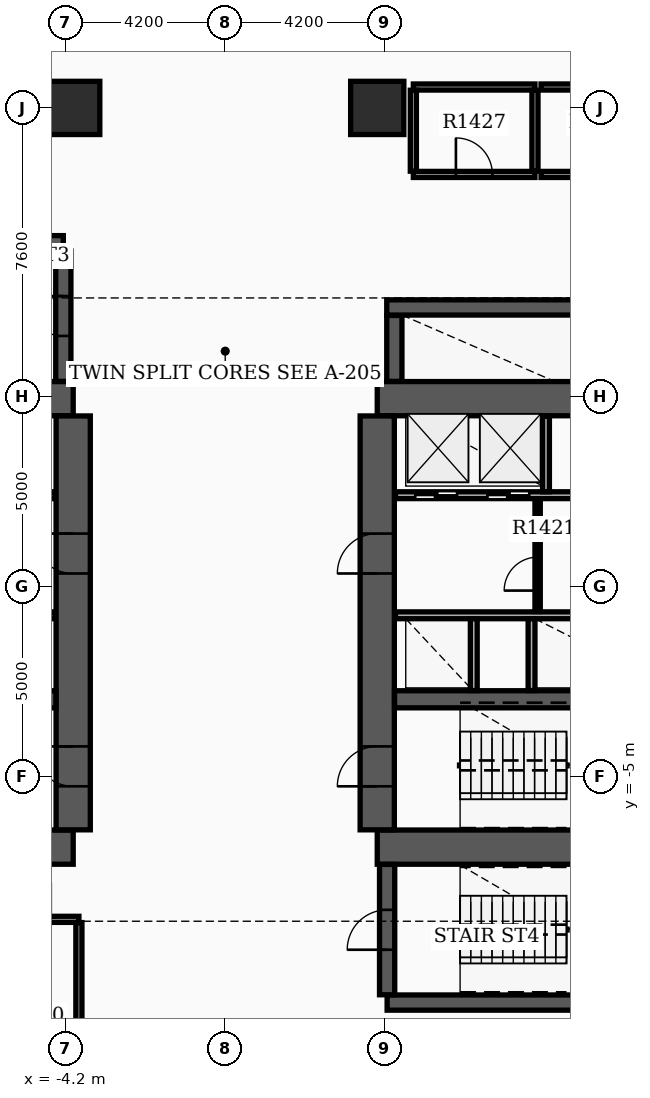
"""IFC4 building model, lengths in metres.
Left out: names, types, materials, properties, quantities, classifications, styles, units other than length and angle.
Written with IfcOpenShell. Run it as: python <this file> out.ifc"""

import sys

from ifc_helpers import new_model, si_unit, direction, frame, frame_2d, origin, origin_2d, place, context, subcontext, project, spatial, rectangle, extrude, element, fill, save


model = new_model("IFC4")
c1 = context("Model", 3, precision=1e-05, world=origin(), true_north=direction((0.0, 1.0)))
c2 = subcontext(c1, "Body", "Model", "MODEL_VIEW")
j1 = project(units=[si_unit("LENGTHUNIT", "METRE"), si_unit("PLANEANGLEUNIT", "RADIAN")], contexts=[c1])
p1 = place(None, origin())
s1 = spatial("IfcSite", under=j1, at=p1, CompositionType="ELEMENT")
p2 = place(p1, origin())
s2 = spatial("IfcBuilding", under=s1, at=p2, CompositionType="ELEMENT")
p3 = place(p2, frame((0.0, 0.0, 91.2)))
s3 = spatial("IfcBuildingStorey", under=s2, at=p3, CompositionType="ELEMENT", Elevation=91.2)
for number, where, z_axis, x_axis in (
    (1, (-12.4, -6.85, 0.0), (0.0, 0.0, 1.0), (1.0, 0.0, 0.0)),
    (2, (-12.4, 4.95, 0.0), (0.0, 0.0, 1.0), (1.0, 0.0, 0.0)),
):
    element("IfcWall", number, at=place(p3, frame(where, z_axis=z_axis, x_axis=x_axis)), inside=s3, PredefinedType="SHEAR", context=c2, shape_type="SweptSolid", body=[
        extrude(rectangle(XDim=8.4, YDim=0.9, at=frame_2d((4.2, 0.0))), origin(), (0.0, 0.0, 1.0), 3.65),
    ])
p4 = place(p3, frame((-4.0, -6.395, 0.0), z_axis=(0.0, 0.0, 1.0), x_axis=(0.0, 1.0, 0.0)))
e3 = element("IfcWall", 3, at=p4, inside=s3, PredefinedType="SHEAR", context=c2, shape_type="SweptSolid", body=[
    extrude(rectangle(XDim=10.89, YDim=0.9, at=frame_2d((5.445, 0.0))), origin(), (0.0, 0.0, 1.0), 3.65),
])
p5 = place(p4, frame((1.145, 0.0, 0.0)))
e4 = element("IfcOpeningElement", 4, at=p5, cuts=e3, PredefinedType="OPENING", context=c2, shape_type="SweptSolid", body=[
    extrude(rectangle(XDim=1.05, YDim=2.15, at=frame_2d((0.525, 1.075))), frame((0.0, 0.46, 0.0), z_axis=(0.0, -1.0, 0.0), x_axis=(1.0, 0.0, 0.0)), (0.0, 0.0, 1.0), 0.92),
])
p6 = place(p4, frame((6.745, 0.0, 0.0)))
e5 = element("IfcOpeningElement", 5, at=p6, cuts=e3, PredefinedType="OPENING", context=c2, shape_type="SweptSolid", body=[
    extrude(rectangle(XDim=1.05, YDim=2.15, at=frame_2d((0.525, 1.075))), frame((0.0, 0.46, 0.0), z_axis=(0.0, -1.0, 0.0), x_axis=(1.0, 0.0, 0.0)), (0.0, 0.0, 1.0), 0.92),
])
p7 = place(p3, frame((-11.945, -2.96, 0.0), z_axis=(0.0, 0.0, 1.0), x_axis=(1.0, 0.0, 0.0)))
e6 = element("IfcWall", 6, at=p7, inside=s3, PredefinedType="SHEAR", context=c2, shape_type="SweptSolid", body=[
    extrude(rectangle(XDim=7.49, YDim=0.45, at=frame_2d((3.745, 0.0))), origin(), (0.0, 0.0, 1.0), 3.65),
])
for number, where, z_axis, x_axis in (
    (7, (4.0, -6.85, 0.0), (0.0, 0.0, 1.0), (1.0, 0.0, 0.0)),
    (8, (4.0, 4.95, 0.0), (0.0, 0.0, 1.0), (1.0, 0.0, 0.0)),
):
    element("IfcWall", number, at=place(p3, frame(where, z_axis=z_axis, x_axis=x_axis)), inside=s3, PredefinedType="SHEAR", context=c2, shape_type="SweptSolid", body=[
        extrude(rectangle(XDim=8.4, YDim=0.9, at=frame_2d((4.2, 0.0))), origin(), (0.0, 0.0, 1.0), 3.65),
    ])
p8 = place(p3, frame((4.0, -6.395, 0.0), z_axis=(0.0, 0.0, 1.0), x_axis=(0.0, 1.0, 0.0)))
e9 = element("IfcWall", 9, at=p8, inside=s3, PredefinedType="SHEAR", context=c2, shape_type="SweptSolid", body=[
    extrude(rectangle(XDim=10.89, YDim=0.9, at=frame_2d((5.445, 0.0))), origin(), (0.0, 0.0, 1.0), 3.65),
])
p9 = place(p8, frame((1.145, 0.0, 0.0)))
e10 = element("IfcOpeningElement", 10, at=p9, cuts=e9, PredefinedType="OPENING", context=c2, shape_type="SweptSolid", body=[
    extrude(rectangle(XDim=1.05, YDim=2.15, at=frame_2d((0.525, 1.075))), frame((0.0, 0.46, 0.0), z_axis=(0.0, -1.0, 0.0), x_axis=(1.0, 0.0, 0.0)), (0.0, 0.0, 1.0), 0.92),
])
p10 = place(p8, frame((6.745, 0.0, 0.0)))
e11 = element("IfcOpeningElement", 11, at=p10, cuts=e9, PredefinedType="OPENING", context=c2, shape_type="SweptSolid", body=[
    extrude(rectangle(XDim=1.05, YDim=2.15, at=frame_2d((0.525, 1.075))), frame((0.0, 0.46, 0.0), z_axis=(0.0, -1.0, 0.0), x_axis=(1.0, 0.0, 0.0)), (0.0, 0.0, 1.0), 0.92),
])
p11 = place(p3, frame((4.455, -2.96, 0.0), z_axis=(0.0, 0.0, 1.0), x_axis=(1.0, 0.0, 0.0)))
e12 = element("IfcWall", 12, at=p11, inside=s3, PredefinedType="SHEAR", context=c2, shape_type="SweptSolid", body=[
    extrude(rectangle(XDim=7.49, YDim=0.45, at=frame_2d((3.745, 0.0))), origin(), (0.0, 0.0, 1.0), 3.65),
])
p12 = place(p3, frame((-12.22, 9.04, 0.0), z_axis=(0.0, 0.0, 1.0), x_axis=(1.0, 0.0, 0.0)))
e13 = element("IfcWall", 13, at=p12, inside=s3, PredefinedType="SHEAR", context=c2, shape_type="SweptSolid", body=[
    extrude(rectangle(XDim=7.96, YDim=0.4, at=frame_2d((3.98, 0.0))), origin(), (0.0, 0.0, 1.0), 3.65),
])
p13 = place(p3, frame((-4.26, 5.405, 0.0), z_axis=(0.0, 0.0, 1.0), x_axis=(0.0, 1.0, 0.0)))
e14 = element("IfcWall", 14, at=p13, inside=s3, PredefinedType="SHEAR", context=c2, shape_type="SweptSolid", body=[
    extrude(rectangle(XDim=3.43, YDim=0.4, at=frame_2d((1.715, 0.0))), origin(), (0.0, 0.0, 1.0), 3.65),
])
p14 = place(p13, frame((1.195, 0.0, 0.0)))
e15 = element("IfcOpeningElement", 15, at=p14, cuts=e14, PredefinedType="OPENING", context=c2, shape_type="SweptSolid", body=[
    extrude(rectangle(XDim=1.05, YDim=2.15, at=frame_2d((0.525, 1.075))), frame((0.0, 0.21, 0.0), z_axis=(0.0, -1.0, 0.0), x_axis=(1.0, 0.0, 0.0)), (0.0, 0.0, 1.0), 0.42),
])
p15 = place(p3, frame((4.26, -10.94, 0.0), z_axis=(0.0, 0.0, 1.0), x_axis=(1.0, 0.0, 0.0)))
e16 = element("IfcWall", 16, at=p15, inside=s3, PredefinedType="SHEAR", context=c2, shape_type="SweptSolid", body=[
    extrude(rectangle(XDim=7.96, YDim=0.4, at=frame_2d((3.98, 0.0))), origin(), (0.0, 0.0, 1.0), 3.65),
])
p16 = place(p3, frame((4.26, -10.735, 0.0), z_axis=(0.0, 0.0, 1.0), x_axis=(0.0, 1.0, 0.0)))
e17 = element("IfcWall", 17, at=p16, inside=s3, PredefinedType="SHEAR", context=c2, shape_type="SweptSolid", body=[
    extrude(rectangle(XDim=3.43, YDim=0.4, at=frame_2d((1.715, 0.0))), origin(), (0.0, 0.0, 1.0), 3.65),
])
p17 = place(p16, frame((1.185, 0.0, 0.0)))
e18 = element("IfcOpeningElement", 18, at=p17, cuts=e17, PredefinedType="OPENING", context=c2, shape_type="SweptSolid", body=[
    extrude(rectangle(XDim=1.05, YDim=2.15, at=frame_2d((0.525, 1.075))), frame((0.0, 0.21, 0.0), z_axis=(0.0, -1.0, 0.0), x_axis=(1.0, 0.0, 0.0)), (0.0, 0.0, 1.0), 0.42),
])
p18 = place(p3, frame((4.45, 5.405, 0.0), z_axis=(0.0, 0.0, 1.0), x_axis=(0.0, 1.0, 0.0)))
e19 = element("IfcWall", 19, at=p18, inside=s3, PredefinedType="SHEAR", context=c2, shape_type="SweptSolid", body=[
    extrude(rectangle(XDim=1.735, YDim=0.4, at=frame_2d((0.867, 0.0))), origin(), (0.0, 0.0, 1.0), 3.65),
])
p19 = place(p3, frame((4.25, 7.35, 0.0), z_axis=(0.0, 0.0, 1.0), x_axis=(1.0, 0.0, 0.0)))
e20 = element("IfcWall", 20, at=p19, inside=s3, PredefinedType="SHEAR", context=c2, shape_type="SweptSolid", body=[
    extrude(rectangle(XDim=5.4, YDim=0.4, at=frame_2d((2.7, 0.0))), origin(), (0.0, 0.0, 1.0), 3.65),
])
for number, where, z_axis, x_axis in (
    (21, (4.0, 12.6, 0.0), (0.0, 0.0, 1.0), (1.0, 0.0, 0.0)),
    (22, (-4.0, 12.6, 0.0), (0.0, 0.0, 1.0), (1.0, 0.0, 0.0)),
):
    element("IfcColumn", number, at=place(p3, frame(where, z_axis=z_axis, x_axis=x_axis)), inside=s3, PredefinedType="COLUMN", context=c2, shape_type="SweptSolid", body=[
        extrude(rectangle(XDim=1.4, YDim=1.4, at=origin_2d()), origin(), (0.0, 0.0, 1.0), 3.9),
    ])
p20 = place(p3, frame((13.843, 14.164, 0.0), z_axis=(0.0, 0.0, 1.0), x_axis=(-0.998889082162, 0.047123258997, 0.0)))
e23 = element("IfcWall", 23, at=p20, inside=s3, PredefinedType="STANDARD", context=c2, shape_type="SweptSolid", body=[
    extrude(rectangle(XDim=6.3, YDim=0.28, at=frame_2d((3.15, 0.0))), origin(), (0.0, 0.0, 1.0), 2.86),
])
p21 = place(p3, frame((-11.9, 2.41, 0.0), z_axis=(0.0, 0.0, 1.0), x_axis=(1.0, 0.0, 0.0)))
e24 = element("IfcWall", 24, at=p21, inside=s3, PredefinedType="SOLIDWALL", context=c2, shape_type="SweptSolid", body=[
    extrude(rectangle(XDim=7.42, YDim=0.18, at=frame_2d((3.71, 0.0))), origin(), (0.0, 0.0, 1.0), 2.85),
])
p22 = place(p21, frame((0.55, 0.0, 0.0)))
e25 = element("IfcOpeningElement", 25, at=p22, cuts=e24, PredefinedType="OPENING", context=c2, shape_type="SweptSolid", body=[
    extrude(rectangle(XDim=1.1, YDim=2.15, at=frame_2d((0.55, 1.075))), frame((0.0, 0.1, 0.0), z_axis=(0.0, -1.0, 0.0), x_axis=(1.0, 0.0, 0.0)), (0.0, 0.0, 1.0), 0.2),
])
p23 = place(p21, frame((3.85, 0.0, 0.0)))
e26 = element("IfcOpeningElement", 26, at=p23, cuts=e24, PredefinedType="OPENING", context=c2, shape_type="SweptSolid", body=[
    extrude(rectangle(XDim=1.1, YDim=2.15, at=frame_2d((0.55, 1.075))), frame((0.0, 0.1, 0.0), z_axis=(0.0, -1.0, 0.0), x_axis=(1.0, 0.0, 0.0)), (0.0, 0.0, 1.0), 0.2),
])
p24 = place(p21, frame((5.75, 0.0, 0.0)))
e27 = element("IfcOpeningElement", 27, at=p24, cuts=e24, PredefinedType="OPENING", context=c2, shape_type="SweptSolid", body=[
    extrude(rectangle(XDim=1.1, YDim=2.15, at=frame_2d((0.55, 1.075))), frame((0.0, 0.1, 0.0), z_axis=(0.0, -1.0, 0.0), x_axis=(1.0, 0.0, 0.0)), (0.0, 0.0, 1.0), 0.2),
])
p25 = place(p3, frame((4.48, 2.41, 0.0), z_axis=(0.0, 0.0, 1.0), x_axis=(1.0, 0.0, 0.0)))
e28 = element("IfcWall", 28, at=p25, inside=s3, PredefinedType="SOLIDWALL", context=c2, shape_type="SweptSolid", body=[
    extrude(rectangle(XDim=7.42, YDim=0.18, at=frame_2d((3.71, 0.0))), origin(), (0.0, 0.0, 1.0), 2.85),
])
p26 = place(p25, frame((5.67, 0.0, 0.0)))
e29 = element("IfcOpeningElement", 29, at=p26, cuts=e28, PredefinedType="OPENING", context=c2, shape_type="SweptSolid", body=[
    extrude(rectangle(XDim=1.1, YDim=2.15, at=frame_2d((0.55, 1.075))), frame((0.0, 0.1, 0.0), z_axis=(0.0, -1.0, 0.0), x_axis=(1.0, 0.0, 0.0)), (0.0, 0.0, 1.0), 0.2),
])
p27 = place(p25, frame((0.52, 0.0, 0.0)))
e30 = element("IfcOpeningElement", 30, at=p27, cuts=e28, PredefinedType="OPENING", context=c2, shape_type="SweptSolid", body=[
    extrude(rectangle(XDim=1.1, YDim=2.15, at=frame_2d((0.55, 1.075))), frame((0.0, 0.1, 0.0), z_axis=(0.0, -1.0, 0.0), x_axis=(1.0, 0.0, 0.0)), (0.0, 0.0, 1.0), 0.2),
])
p28 = place(p25, frame((2.42, 0.0, 0.0)))
e31 = element("IfcOpeningElement", 31, at=p28, cuts=e28, PredefinedType="OPENING", context=c2, shape_type="SweptSolid", body=[
    extrude(rectangle(XDim=1.1, YDim=2.15, at=frame_2d((0.55, 1.075))), frame((0.0, 0.1, 0.0), z_axis=(0.0, -1.0, 0.0), x_axis=(1.0, 0.0, 0.0)), (0.0, 0.0, 1.0), 0.2),
])
for number, where, z_axis, x_axis in (
    (32, (-11.9, -0.75, 0.0), (0.0, 0.0, 1.0), (1.0, 0.0, 0.0)),
    (33, (4.48, -0.75, 0.0), (0.0, 0.0, 1.0), (1.0, 0.0, 0.0)),
):
    element("IfcWall", number, at=place(p3, frame(where, z_axis=z_axis, x_axis=x_axis)), inside=s3, PredefinedType="SOLIDWALL", context=c2, shape_type="SweptSolid", body=[
        extrude(rectangle(XDim=7.42, YDim=0.18, at=frame_2d((3.71, 0.0))), origin(), (0.0, 0.0, 1.0), 2.85),
    ])
p29 = place(p3, frame((8.44, 2.5, 0.0), z_axis=(0.0, 0.0, 1.0), x_axis=(0.0, 1.0, 0.0)))
e34 = element("IfcWall", 34, at=p29, inside=s3, PredefinedType="SOLIDWALL", context=c2, shape_type="SweptSolid", body=[
    extrude(rectangle(XDim=1.99, YDim=0.18, at=frame_2d((0.995, 0.0))), origin(), (0.0, 0.0, 1.0), 2.85),
])
for number, where, z_axis, x_axis in (
    (35, (6.54, -2.73, 0.0), (0.0, 0.0, 1.0), (0.0, 1.0, 0.0)),
    (36, (8.06, -2.73, 0.0), (0.0, 0.0, 1.0), (0.0, 1.0, 0.0)),
):
    element("IfcWall", number, at=place(p3, frame(where, z_axis=z_axis, x_axis=x_axis)), inside=s3, PredefinedType="SOLIDWALL", context=c2, shape_type="SweptSolid", body=[
        extrude(rectangle(XDim=1.89, YDim=0.18, at=frame_2d((0.945, 0.0))), origin(), (0.0, 0.0, 1.0), 2.85),
    ])
p30 = place(p3, frame((8.22, -0.65, 0.0), z_axis=(0.0, 0.0, 1.0), x_axis=(0.0, 1.0, 0.0)))
e37 = element("IfcWall", 37, at=p30, inside=s3, PredefinedType="SOLIDWALL", context=c2, shape_type="SweptSolid", body=[
    extrude(rectangle(XDim=2.96, YDim=0.14, at=frame_2d((1.48, 0.0))), origin(), (0.0, 0.0, 1.0), 2.85),
])
p31 = place(p30, frame((0.55, 0.0, 0.0)))
e38 = element("IfcOpeningElement", 38, at=p31, cuts=e37, PredefinedType="OPENING", context=c2, shape_type="SweptSolid", body=[
    extrude(rectangle(XDim=0.88, YDim=2.1, at=frame_2d((0.44, 1.05))), frame((0.0, 0.08, 0.0), z_axis=(0.0, -1.0, 0.0), x_axis=(1.0, 0.0, 0.0)), (0.0, 0.0, 1.0), 0.16),
])
p32 = place(p3, frame((4.95, 10.85, 0.0), z_axis=(0.0, 0.0, 1.0), x_axis=(1.0, 0.0, 0.0)))
e39 = element("IfcWall", 39, at=p32, inside=s3, PredefinedType="PARTITIONING", context=c2, shape_type="SweptSolid", body=[
    extrude(rectangle(XDim=3.2, YDim=0.16, at=frame_2d((1.6, 0.0))), origin(), (0.0, 0.0, 1.0), 2.85),
])
p33 = place(p32, frame((1.12, 0.0, 0.0)))
e40 = element("IfcOpeningElement", 40, at=p33, cuts=e39, PredefinedType="OPENING", context=c2, shape_type="SweptSolid", body=[
    extrude(rectangle(XDim=0.96, YDim=2.15, at=frame_2d((0.48, 1.075))), frame((0.0, 0.09, 0.0), z_axis=(0.0, -1.0, 0.0), x_axis=(1.0, 0.0, 0.0)), (0.0, 0.0, 1.0), 0.18),
])
p34 = place(p3, frame((4.95, 13.15, 0.0), z_axis=(0.0, 0.0, 1.0), x_axis=(1.0, 0.0, 0.0)))
e41 = element("IfcWall", 41, at=p34, inside=s3, PredefinedType="PARTITIONING", context=c2, shape_type="SweptSolid", body=[
    extrude(rectangle(XDim=3.2, YDim=0.16, at=frame_2d((1.6, 0.0))), origin(), (0.0, 0.0, 1.0), 2.85),
])
for number, where, z_axis, x_axis in (
    (42, (4.95, 10.935, 0.0), (0.0, 0.0, 1.0), (0.0, 1.0, 0.0)),
    (43, (8.15, 10.935, 0.0), (0.0, 0.0, 1.0), (0.0, 1.0, 0.0)),
):
    element("IfcWall", number, at=place(p3, frame(where, z_axis=z_axis, x_axis=x_axis)), inside=s3, PredefinedType="PARTITIONING", context=c2, shape_type="SweptSolid", body=[
        extrude(rectangle(XDim=2.13, YDim=0.16, at=frame_2d((1.065, 0.0))), origin(), (0.0, 0.0, 1.0), 2.85),
    ])
p35 = place(p3, frame((8.31, 10.85, 0.0), z_axis=(0.0, 0.0, 1.0), x_axis=(1.0, 0.0, 0.0)))
e44 = element("IfcWall", 44, at=p35, inside=s3, PredefinedType="PARTITIONING", context=c2, shape_type="SweptSolid", body=[
    extrude(rectangle(XDim=3.14, YDim=0.16, at=frame_2d((1.57, 0.0))), origin(), (0.0, 0.0, 1.0), 2.85),
])
p36 = place(p35, frame((1.09, 0.0, 0.0)))
e45 = element("IfcOpeningElement", 45, at=p36, cuts=e44, PredefinedType="OPENING", context=c2, shape_type="SweptSolid", body=[
    extrude(rectangle(XDim=0.96, YDim=2.15, at=frame_2d((0.48, 1.075))), frame((0.0, 0.09, 0.0), z_axis=(0.0, -1.0, 0.0), x_axis=(1.0, 0.0, 0.0)), (0.0, 0.0, 1.0), 0.18),
])
p37 = place(p3, frame((8.31, 13.15, 0.0), z_axis=(0.0, 0.0, 1.0), x_axis=(1.0, 0.0, 0.0)))
e46 = element("IfcWall", 46, at=p37, inside=s3, PredefinedType="PARTITIONING", context=c2, shape_type="SweptSolid", body=[
    extrude(rectangle(XDim=3.14, YDim=0.16, at=frame_2d((1.57, 0.0))), origin(), (0.0, 0.0, 1.0), 2.85),
])
p38 = place(p3, frame((-6.29, -8.75, 0.0), z_axis=(0.0, 0.0, 1.0), x_axis=(1.0, 0.0, 0.0)))
e47 = element("IfcWall", 47, at=p38, inside=s3, PredefinedType="PARTITIONING", context=c2, shape_type="SweptSolid", body=[
    extrude(rectangle(XDim=2.44, YDim=0.16, at=frame_2d((1.22, 0.0))), origin(), (0.0, 0.0, 1.0), 2.85),
])
p39 = place(p38, frame((0.74, 0.0, 0.0)))
e48 = element("IfcOpeningElement", 48, at=p39, cuts=e47, PredefinedType="OPENING", context=c2, shape_type="SweptSolid", body=[
    extrude(rectangle(XDim=0.96, YDim=2.15, at=frame_2d((0.48, 1.075))), frame((0.0, 0.09, 0.0), z_axis=(0.0, -1.0, 0.0), x_axis=(1.0, 0.0, 0.0)), (0.0, 0.0, 1.0), 0.18),
])
p40 = place(p3, frame((-3.85, -13.065, 0.0), z_axis=(0.0, 0.0, 1.0), x_axis=(0.0, 1.0, 0.0)))
e49 = element("IfcWall", 49, at=p40, inside=s3, PredefinedType="PARTITIONING", context=c2, shape_type="SweptSolid", body=[
    extrude(rectangle(XDim=4.23, YDim=0.16, at=frame_2d((2.115, 0.0))), origin(), (0.0, 0.0, 1.0), 2.85),
])
p41 = place(p5, origin())
e50 = element("IfcDoor", 50, at=p41, inside=s3, OperationType="SINGLE_SWING_RIGHT", PredefinedType="DOOR", context=c2, shape_type="SweptSolid", body=[
    extrude(rectangle(XDim=1.05, YDim=2.15, at=frame_2d((0.525, 1.075))), frame((0.0, 0.025, 0.0), z_axis=(0.0, -1.0, 0.0), x_axis=(1.0, 0.0, 0.0)), (0.0, 0.0, 1.0), 0.05),
])
fill(e4, e50)
p42 = place(p9, origin())
e51 = element("IfcDoor", 51, at=p42, inside=s3, OperationType="SINGLE_SWING_LEFT", PredefinedType="DOOR", context=c2, shape_type="SweptSolid", body=[
    extrude(rectangle(XDim=1.05, YDim=2.15, at=frame_2d((0.525, 1.075))), frame((0.0, 0.025, 0.0), z_axis=(0.0, -1.0, 0.0), x_axis=(1.0, 0.0, 0.0)), (0.0, 0.0, 1.0), 0.05),
])
fill(e10, e51)
p43 = place(p6, origin())
e52 = element("IfcDoor", 52, at=p43, inside=s3, OperationType="SINGLE_SWING_RIGHT", PredefinedType="DOOR", context=c2, shape_type="SweptSolid", body=[
    extrude(rectangle(XDim=1.05, YDim=2.15, at=frame_2d((0.525, 1.075))), frame((0.0, 0.025, 0.0), z_axis=(0.0, -1.0, 0.0), x_axis=(1.0, 0.0, 0.0)), (0.0, 0.0, 1.0), 0.05),
])
fill(e5, e52)
p44 = place(p10, origin())
e53 = element("IfcDoor", 53, at=p44, inside=s3, OperationType="SINGLE_SWING_LEFT", PredefinedType="DOOR", context=c2, shape_type="SweptSolid", body=[
    extrude(rectangle(XDim=1.05, YDim=2.15, at=frame_2d((0.525, 1.075))), frame((0.0, 0.025, 0.0), z_axis=(0.0, -1.0, 0.0), x_axis=(1.0, 0.0, 0.0)), (0.0, 0.0, 1.0), 0.05),
])
fill(e11, e53)
p45 = place(p14, origin())
e54 = element("IfcDoor", 54, at=p45, inside=s3, OperationType="SINGLE_SWING_RIGHT", PredefinedType="DOOR", context=c2, shape_type="SweptSolid", body=[
    extrude(rectangle(XDim=1.05, YDim=2.15, at=frame_2d((0.525, 1.075))), frame((0.0, 0.025, 0.0), z_axis=(0.0, -1.0, 0.0), x_axis=(1.0, 0.0, 0.0)), (0.0, 0.0, 1.0), 0.05),
])
fill(e15, e54)
p46 = place(p17, origin())
e55 = element("IfcDoor", 55, at=p46, inside=s3, OperationType="SINGLE_SWING_LEFT", PredefinedType="DOOR", context=c2, shape_type="SweptSolid", body=[
    extrude(rectangle(XDim=1.05, YDim=2.15, at=frame_2d((0.525, 1.075))), frame((0.0, 0.025, 0.0), z_axis=(0.0, -1.0, 0.0), x_axis=(1.0, 0.0, 0.0)), (0.0, 0.0, 1.0), 0.05),
])
fill(e18, e55)
p47 = place(p27, origin())
e56 = element("IfcDoor", 56, at=p47, inside=s3, OperationType="DOUBLE_DOOR_SLIDING", PredefinedType="DOOR", context=c2, shape_type="SweptSolid", body=[
    extrude(rectangle(XDim=1.1, YDim=2.15, at=frame_2d((0.55, 1.075))), frame((0.0, 0.025, 0.0), z_axis=(0.0, -1.0, 0.0), x_axis=(1.0, 0.0, 0.0)), (0.0, 0.0, 1.0), 0.05),
])
fill(e30, e56)
p48 = place(p28, origin())
e57 = element("IfcDoor", 57, at=p48, inside=s3, OperationType="DOUBLE_DOOR_SLIDING", PredefinedType="DOOR", context=c2, shape_type="SweptSolid", body=[
    extrude(rectangle(XDim=1.1, YDim=2.15, at=frame_2d((0.55, 1.075))), frame((0.0, 0.025, 0.0), z_axis=(0.0, -1.0, 0.0), x_axis=(1.0, 0.0, 0.0)), (0.0, 0.0, 1.0), 0.05),
])
fill(e31, e57)
p49 = place(p31, origin())
e58 = element("IfcDoor", 58, at=p49, inside=s3, OperationType="SINGLE_SWING_LEFT", PredefinedType="DOOR", context=c2, shape_type="SweptSolid", body=[
    extrude(rectangle(XDim=0.88, YDim=2.1, at=frame_2d((0.44, 1.05))), frame((0.0, 0.025, 0.0), z_axis=(0.0, -1.0, 0.0), x_axis=(1.0, 0.0, 0.0)), (0.0, 0.0, 1.0), 0.05),
])
fill(e38, e58)
p50 = place(p33, origin())
e59 = element("IfcDoor", 59, at=p50, inside=s3, OperationType="SINGLE_SWING_LEFT", PredefinedType="DOOR", context=c2, shape_type="SweptSolid", body=[
    extrude(rectangle(XDim=0.96, YDim=2.15, at=frame_2d((0.48, 1.075))), frame((0.0, 0.025, 0.0), z_axis=(0.0, -1.0, 0.0), x_axis=(1.0, 0.0, 0.0)), (0.0, 0.0, 1.0), 0.05),
])
fill(e40, e59)
save(model, sys.argv[1])
